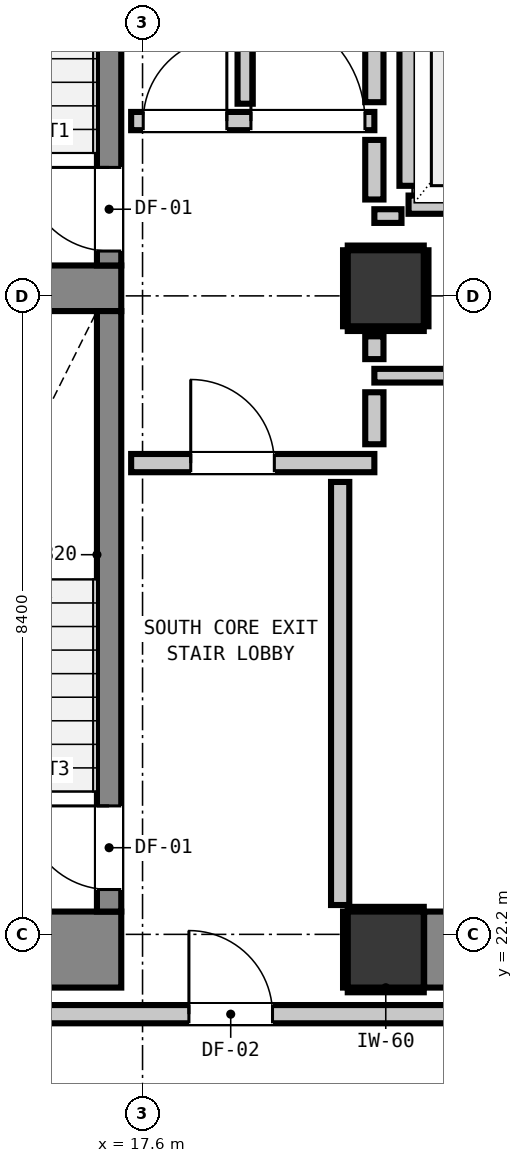
"""IFC4 building model, lengths in metres.
Left out: names, types, materials, properties, quantities, classifications, styles, units other than length and angle.
Written with IfcOpenShell. Run it as: python <this file> out.ifc"""

import sys

from ifc_helpers import new_model, si_unit, direction, frame, frame_2d, origin, origin_2d, place, context, subcontext, project, spatial, rectangle, extrude, element, fill, save


model = new_model("IFC4")
c1 = context("Model", 3, precision=1e-05, world=origin(), true_north=direction((0.0, 1.0)))
c2 = subcontext(c1, "Body", "Model", "MODEL_VIEW")
j1 = project(units=[si_unit("LENGTHUNIT", "METRE"), si_unit("PLANEANGLEUNIT", "RADIAN")], contexts=[c1])
p1 = place(None, origin())
s1 = spatial("IfcSite", under=j1, at=p1, CompositionType="ELEMENT")
p2 = place(p1, origin())
s2 = spatial("IfcBuilding", under=s1, at=p2, CompositionType="ELEMENT")
p3 = place(p2, frame((0.0, 0.0, 132.64)))
s3 = spatial("IfcBuildingStorey", under=s2, at=p3, CompositionType="ELEMENT", Elevation=132.64)
p4 = place(p3, frame((20.8, 22.0, 0.0), z_axis=(0.0, 0.0, 1.0), x_axis=(1.0, 0.0, 0.0)))
e1 = element("IfcColumn", 1, at=p4, inside=s3, PredefinedType="COLUMN", context=c2, shape_type="SweptSolid", body=[
    extrude(rectangle(XDim=1.0, YDim=1.0, at=origin_2d()), origin(), (0.0, 0.0, 1.0), 3.32),
])
p5 = place(p3, frame((13.24, 22.0, 0.0), z_axis=(0.0, 0.0, 1.0), x_axis=(1.0, 0.0, 0.0)))
e2 = element("IfcWall", 2, at=p5, inside=s3, PredefinedType="SHEAR", context=c2, shape_type="SweptSolid", body=[
    extrude(rectangle(XDim=4.08, YDim=1.0, at=frame_2d((2.04, 0.0))), origin(), (0.0, 0.0, 1.0), 3.32),
])
p6 = place(p3, frame((13.905, 30.7, 0.0), z_axis=(0.0, 0.0, 1.0), x_axis=(1.0, 0.0, 0.0)))
e3 = element("IfcWall", 3, at=p6, inside=s3, PredefinedType="SHEAR", context=c2, shape_type="SweptSolid", body=[
    extrude(rectangle(XDim=3.415, YDim=0.6, at=frame_2d((1.708, 0.0))), origin(), (0.0, 0.0, 1.0), 3.32),
])
p7 = place(p3, frame((21.305, 22.0, 0.0), z_axis=(0.0, 0.0, 1.0), x_axis=(1.0, 0.0, 0.0)))
e4 = element("IfcWall", 4, at=p7, inside=s3, PredefinedType="SHEAR", context=c2, shape_type="SweptSolid", body=[
    extrude(rectangle(XDim=7.39, YDim=1.0, at=frame_2d((3.695, 0.0))), origin(), (0.0, 0.0, 1.0), 3.32),
])
p8 = place(p3, frame((17.16, 31.0, 0.0), z_axis=(0.0, 0.0, 1.0), x_axis=(0.0, 1.0, 0.0)))
e5 = element("IfcWall", 5, at=p8, inside=s3, PredefinedType="SHEAR", context=c2, shape_type="SweptSolid", body=[
    extrude(rectangle(XDim=7.8, YDim=0.32, at=frame_2d((3.9, 0.0))), origin(), (0.0, 0.0, 1.0), 3.32),
])
p9 = place(p8, frame((0.19, 0.0, 0.0)))
e6 = element("IfcOpeningElement", 6, at=p9, cuts=e5, PredefinedType="OPENING", context=c2, shape_type="SweptSolid", body=[
    extrude(rectangle(XDim=1.1, YDim=2.15, at=frame_2d((0.55, 1.075))), frame((0.0, 0.17, 0.0), z_axis=(0.0, -1.0, 0.0), x_axis=(1.0, 0.0, 0.0)), (0.0, 0.0, 1.0), 0.34),
])
p10 = place(p3, frame((17.16, 22.5, 0.0), z_axis=(0.0, 0.0, 1.0), x_axis=(0.0, 1.0, 0.0)))
e7 = element("IfcWall", 7, at=p10, inside=s3, PredefinedType="SHEAR", context=c2, shape_type="SweptSolid", body=[
    extrude(rectangle(XDim=7.9, YDim=0.32, at=frame_2d((3.95, 0.0))), origin(), (0.0, 0.0, 1.0), 3.32),
])
p11 = place(p10, frame((0.29, 0.0, 0.0)))
e8 = element("IfcOpeningElement", 8, at=p11, cuts=e7, PredefinedType="OPENING", context=c2, shape_type="SweptSolid", body=[
    extrude(rectangle(XDim=1.1, YDim=2.15, at=frame_2d((0.55, 1.075))), frame((0.0, 0.17, 0.0), z_axis=(0.0, -1.0, 0.0), x_axis=(1.0, 0.0, 0.0)), (0.0, 0.0, 1.0), 0.34),
])
p12 = place(p3, frame((20.8, 30.7, 0.0), z_axis=(0.0, 0.0, 1.0), x_axis=(1.0, 0.0, 0.0)))
e9 = element("IfcColumn", 9, at=p12, inside=s3, PredefinedType="COLUMN", context=c2, shape_type="SweptSolid", body=[
    extrude(rectangle(XDim=1.0, YDim=1.0, at=origin_2d()), origin(), (0.0, 0.0, 1.0), 3.32),
])
p13 = place(p3, frame((21.1, 31.8, 0.0), z_axis=(0.0, 0.0, 1.0), x_axis=(1.0, 0.0, 0.0)))
e10 = element("IfcWall", 10, at=p13, inside=s3, PredefinedType="PARTITIONING", context=c2, shape_type="SweptSolid", body=[
    extrude(rectangle(XDim=2.2, YDim=0.24, at=frame_2d((1.1, 0.0))), origin(), (0.0, 0.0, 1.0), 3.08),
])
p14 = place(p3, frame((21.1, 32.048, 0.0), z_axis=(0.0, 0.0, 1.0), x_axis=(0.0, 1.0, 0.0)))
e11 = element("IfcWall", 11, at=p14, inside=s3, PredefinedType="PARTITIONING", context=c2, shape_type="SweptSolid", body=[
    extrude(rectangle(XDim=2.104, YDim=0.24, at=frame_2d((1.052, 0.0))), origin(), (0.0, 0.0, 1.0), 2.315),
])
p15 = place(p3, frame((9.407, 21.15, 0.0), z_axis=(0.0, 0.0, 1.0), x_axis=(1.0, 0.0, 0.0)))
e12 = element("IfcWall", 12, at=p15, inside=s3, PredefinedType="PARTITIONING", context=c2, shape_type="SweptSolid", body=[
    extrude(rectangle(XDim=39.386, YDim=0.24, at=frame_2d((19.693, 0.0))), origin(), (0.0, 0.0, 1.0), 3.08),
])
p16 = place(p15, frame((8.803, 0.0, 0.0)))
e13 = element("IfcOpeningElement", 13, at=p16, cuts=e12, PredefinedType="OPENING", context=c2, shape_type="SweptSolid", body=[
    extrude(rectangle(XDim=1.1, YDim=2.15, at=frame_2d((0.55, 1.075))), frame((0.0, 0.13, 0.0), z_axis=(0.0, -1.0, 0.0), x_axis=(1.0, 0.0, 0.0)), (0.0, 0.0, 1.0), 0.26),
])
p17 = place(p15, frame((1.192, 0.0, 0.0)))
e14 = element("IfcOpeningElement", 14, at=p17, cuts=e12, PredefinedType="OPENING", context=c2, shape_type="SweptSolid", body=[
    extrude(rectangle(XDim=1.4, YDim=2.15, at=frame_2d((0.7, 1.075))), frame((0.0, 0.13, 0.0), z_axis=(0.0, -1.0, 0.0), x_axis=(1.0, 0.0, 0.0)), (0.0, 0.0, 1.0), 0.26),
])
p18 = place(p15, frame((28.643, 0.0, 0.0)))
e15 = element("IfcOpeningElement", 15, at=p18, cuts=e12, PredefinedType="OPENING", context=c2, shape_type="SweptSolid", body=[
    extrude(rectangle(XDim=1.4, YDim=2.15, at=frame_2d((0.7, 1.075))), frame((0.0, 0.13, 0.0), z_axis=(0.0, -1.0, 0.0), x_axis=(1.0, 0.0, 0.0)), (0.0, 0.0, 1.0), 0.26),
])
p19 = place(p3, frame((17.45, 28.4, 0.0), z_axis=(0.0, 0.0, 1.0), x_axis=(1.0, 0.0, 0.0)))
e16 = element("IfcWall", 16, at=p19, inside=s3, PredefinedType="PARTITIONING", context=c2, shape_type="SweptSolid", body=[
    extrude(rectangle(XDim=3.2, YDim=0.24, at=frame_2d((1.6, 0.0))), origin(), (0.0, 0.0, 1.0), 3.08),
])
p20 = place(p19, frame((0.784, 0.0, 0.0)))
e17 = element("IfcOpeningElement", 17, at=p20, cuts=e16, PredefinedType="OPENING", context=c2, shape_type="SweptSolid", body=[
    extrude(rectangle(XDim=1.1, YDim=2.15, at=frame_2d((0.55, 1.075))), frame((0.0, 0.13, 0.0), z_axis=(0.0, -1.0, 0.0), x_axis=(1.0, 0.0, 0.0)), (0.0, 0.0, 1.0), 0.26),
])
p21 = place(p3, frame((17.45, 32.9, 0.0), z_axis=(0.0, 0.0, 1.0), x_axis=(1.0, 0.0, 0.0)))
e18 = element("IfcWall", 18, at=p21, inside=s3, PredefinedType="PARTITIONING", context=c2, shape_type="SweptSolid", body=[
    extrude(rectangle(XDim=3.2, YDim=0.24, at=frame_2d((1.6, 0.0))), origin(), (0.0, 0.0, 1.0), 3.08),
])
p22 = place(p21, frame((0.159, 0.0, 0.0)))
e19 = element("IfcOpeningElement", 19, at=p22, cuts=e18, PredefinedType="OPENING", context=c2, shape_type="SweptSolid", body=[
    extrude(rectangle(XDim=1.1, YDim=2.15, at=frame_2d((0.55, 1.075))), frame((0.0, 0.13, 0.0), z_axis=(0.0, -1.0, 0.0), x_axis=(1.0, 0.0, 0.0)), (0.0, 0.0, 1.0), 0.26),
])
p23 = place(p21, frame((1.576, 0.0, 0.0)))
e20 = element("IfcOpeningElement", 20, at=p23, cuts=e18, PredefinedType="OPENING", context=c2, shape_type="SweptSolid", body=[
    extrude(rectangle(XDim=1.5, YDim=2.15, at=frame_2d((0.75, 1.075))), frame((0.0, 0.13, 0.0), z_axis=(0.0, -1.0, 0.0), x_axis=(1.0, 0.0, 0.0)), (0.0, 0.0, 1.0), 0.26),
])
p24 = place(p3, frame((20.65, 29.55, 0.0), z_axis=(0.0, 0.0, 1.0), x_axis=(1.0, 0.0, 0.0)))
e21 = element("IfcWall", 21, at=p24, inside=s3, PredefinedType="PARTITIONING", context=c2, shape_type="SweptSolid", body=[
    extrude(rectangle(XDim=9.325, YDim=0.18, at=frame_2d((4.663, 0.0))), origin(), (0.0, 0.0, 1.0), 3.08),
])
p25 = place(p3, frame((20.65, 31.65, 0.0), z_axis=(0.0, 0.0, 1.0), x_axis=(1.0, 0.0, 0.0)))
e22 = element("IfcWall", 22, at=p25, inside=s3, PredefinedType="PARTITIONING", context=c2, shape_type="SweptSolid", body=[
    extrude(rectangle(XDim=0.357, YDim=0.18, at=frame_2d((0.179, 0.0))), origin(), (0.0, 0.0, 1.0), 3.08),
])
p26 = place(p3, frame((20.2, 22.586, 0.0), z_axis=(0.0, 0.0, 1.0), x_axis=(0.0, 1.0, 0.0)))
e23 = element("IfcWall", 23, at=p26, inside=s3, PredefinedType="PARTITIONING", context=c2, shape_type="SweptSolid", body=[
    extrude(rectangle(XDim=5.566, YDim=0.24, at=frame_2d((2.783, 0.0))), origin(), (0.0, 0.0, 1.0), 3.08),
])
p27 = place(p3, frame((20.65, 28.648, 0.0), z_axis=(0.0, 0.0, 1.0), x_axis=(0.0, 1.0, 0.0)))
e24 = element("IfcWall", 24, at=p27, inside=s3, PredefinedType="PARTITIONING", context=c2, shape_type="SweptSolid", body=[
    extrude(rectangle(XDim=0.684, YDim=0.24, at=frame_2d((0.342, 0.0))), origin(), (0.0, 0.0, 1.0), 2.315),
])
p28 = place(p3, frame((20.65, 29.768, 0.0), z_axis=(0.0, 0.0, 1.0), x_axis=(0.0, 1.0, 0.0)))
e25 = element("IfcWall", 25, at=p28, inside=s3, PredefinedType="PARTITIONING", context=c2, shape_type="SweptSolid", body=[
    extrude(rectangle(XDim=0.3, YDim=0.24, at=frame_2d((0.15, 0.0))), origin(), (0.0, 0.0, 1.0), 2.315),
])
p29 = place(p3, frame((20.65, 31.868, 0.0), z_axis=(0.0, 0.0, 1.0), x_axis=(0.0, 1.0, 0.0)))
e26 = element("IfcWall", 26, at=p29, inside=s3, PredefinedType="PARTITIONING", context=c2, shape_type="SweptSolid", body=[
    extrude(rectangle(XDim=0.784, YDim=0.24, at=frame_2d((0.392, 0.0))), origin(), (0.0, 0.0, 1.0), 2.315),
])
p30 = place(p3, frame((20.65, 33.148, 0.0), z_axis=(0.0, 0.0, 1.0), x_axis=(0.0, 1.0, 0.0)))
e27 = element("IfcWall", 27, at=p30, inside=s3, PredefinedType="PARTITIONING", context=c2, shape_type="SweptSolid", body=[
    extrude(rectangle(XDim=2.274, YDim=0.24, at=frame_2d((1.137, 0.0))), origin(), (0.0, 0.0, 1.0), 2.315),
])
p31 = place(p3, frame((18.95, 33.128, 0.0), z_axis=(0.0, 0.0, 1.0), x_axis=(0.0, 1.0, 0.0)))
e28 = element("IfcWall", 28, at=p31, inside=s3, PredefinedType="PARTITIONING", context=c2, shape_type="SweptSolid", body=[
    extrude(rectangle(XDim=2.314, YDim=0.2, at=frame_2d((1.157, 0.0))), origin(), (0.0, 0.0, 1.0), 3.08),
])
for number, where, z_axis, x_axis in (
    (29, (20.3, 21.468, 0.0), (0.0, 0.0, 1.0), (1.0, 0.0, 0.0)),
    (30, (20.3, 22.532, 0.0), (0.0, 0.0, 1.0), (1.0, 0.0, 0.0)),
    (31, (20.268, 21.5, 0.0), (0.0, 0.0, 1.0), (0.0, 1.0, 0.0)),
    (32, (20.3, 30.168, 0.0), (0.0, 0.0, 1.0), (1.0, 0.0, 0.0)),
    (33, (20.3, 31.232, 0.0), (0.0, 0.0, 1.0), (1.0, 0.0, 0.0)),
    (34, (20.268, 30.2, 0.0), (0.0, 0.0, 1.0), (0.0, 1.0, 0.0)),
    (35, (21.332, 30.2, 0.0), (0.0, 0.0, 1.0), (0.0, 1.0, 0.0)),
):
    element("IfcWall", number, at=place(p3, frame(where, z_axis=z_axis, x_axis=x_axis)), inside=s3, PredefinedType="PARTITIONING", context=c2, shape_type="SweptSolid", body=[
        extrude(rectangle(XDim=1.0, YDim=0.06, at=frame_2d((0.5, 0.0))), origin(), (0.0, 0.0, 1.0), 1.45),
    ])
p32 = place(p9, origin())
e36 = element("IfcDoor", 36, at=p32, inside=s3, OperationType="SINGLE_SWING_RIGHT", PredefinedType="DOOR", context=c2, shape_type="SweptSolid", body=[
    extrude(rectangle(XDim=1.1, YDim=2.15, at=frame_2d((0.55, 1.075))), frame((0.0, 0.025, 0.0), z_axis=(0.0, -1.0, 0.0), x_axis=(1.0, 0.0, 0.0)), (0.0, 0.0, 1.0), 0.05),
])
fill(e6, e36)
p33 = place(p11, origin())
e37 = element("IfcDoor", 37, at=p33, inside=s3, OperationType="SINGLE_SWING_RIGHT", PredefinedType="DOOR", context=c2, shape_type="SweptSolid", body=[
    extrude(rectangle(XDim=1.1, YDim=2.15, at=frame_2d((0.55, 1.075))), frame((0.0, 0.025, 0.0), z_axis=(0.0, -1.0, 0.0), x_axis=(1.0, 0.0, 0.0)), (0.0, 0.0, 1.0), 0.05),
])
fill(e8, e37)
p34 = place(p20, origin())
e38 = element("IfcDoor", 38, at=p34, inside=s3, OperationType="SINGLE_SWING_LEFT", PredefinedType="DOOR", context=c2, shape_type="SweptSolid", body=[
    extrude(rectangle(XDim=1.1, YDim=2.15, at=frame_2d((0.55, 1.075))), frame((0.0, 0.025, 0.0), z_axis=(0.0, -1.0, 0.0), x_axis=(1.0, 0.0, 0.0)), (0.0, 0.0, 1.0), 0.05),
])
fill(e17, e38)
p35 = place(p22, origin())
e39 = element("IfcDoor", 39, at=p35, inside=s3, OperationType="SINGLE_SWING_RIGHT", PredefinedType="DOOR", context=c2, shape_type="SweptSolid", body=[
    extrude(rectangle(XDim=1.1, YDim=2.15, at=frame_2d((0.55, 1.075))), frame((0.0, 0.025, 0.0), z_axis=(0.0, -1.0, 0.0), x_axis=(1.0, 0.0, 0.0)), (0.0, 0.0, 1.0), 0.05),
])
fill(e19, e39)
p36 = place(p16, origin())
e40 = element("IfcDoor", 40, at=p36, inside=s3, OperationType="SINGLE_SWING_LEFT", PredefinedType="DOOR", context=c2, shape_type="SweptSolid", body=[
    extrude(rectangle(XDim=1.1, YDim=2.15, at=frame_2d((0.55, 1.075))), frame((0.0, 0.025, 0.0), z_axis=(0.0, -1.0, 0.0), x_axis=(1.0, 0.0, 0.0)), (0.0, 0.0, 1.0), 0.05),
])
fill(e13, e40)
p37 = place(p23, origin())
e41 = element("IfcDoor", 41, at=p37, inside=s3, OperationType="SINGLE_SWING_LEFT", PredefinedType="DOOR", context=c2, shape_type="SweptSolid", body=[
    extrude(rectangle(XDim=1.5, YDim=2.15, at=frame_2d((0.75, 1.075))), frame((0.0, 0.025, 0.0), z_axis=(0.0, -1.0, 0.0), x_axis=(1.0, 0.0, 0.0)), (0.0, 0.0, 1.0), 0.05),
])
fill(e20, e41)
save(model, sys.argv[1])
